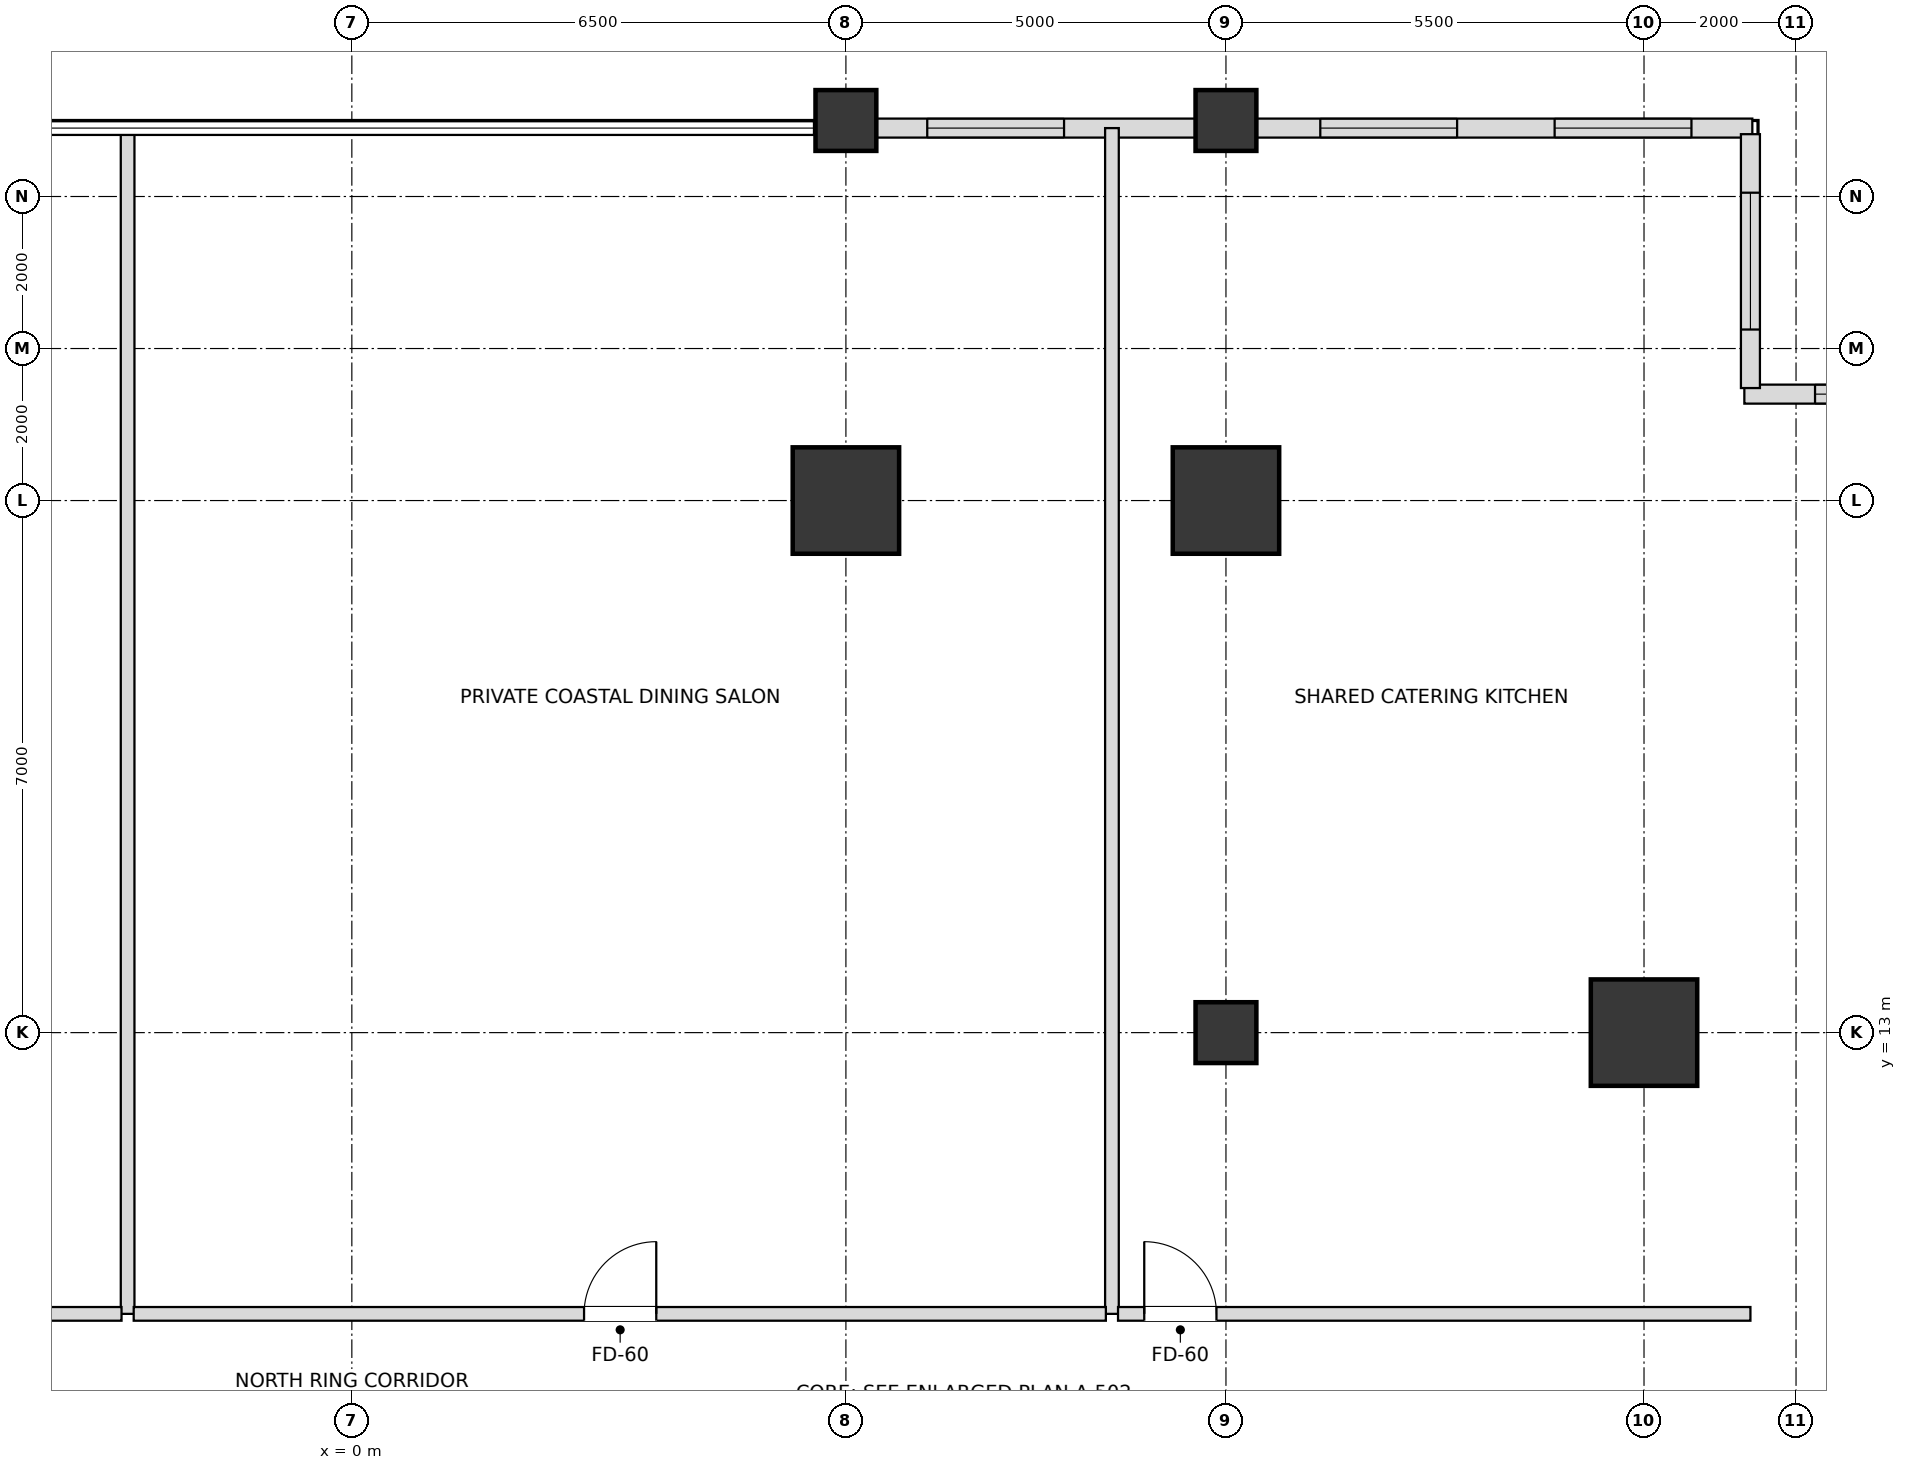
"""IFC4 building model, lengths in metres.
Left out: names, types, materials, properties, quantities, classifications, styles, units other than length and angle.
Written with IfcOpenShell. Run it as: python <this file> out.ifc"""

import sys

from ifc_helpers import new_model, si_unit, direction, frame, frame_2d, origin, origin_2d, place, context, subcontext, project, spatial, rectangle, extrude, element, fill, save


model = new_model("IFC4")
c1 = context("Model", 3, precision=1e-05, world=origin(), true_north=direction((0.0, 1.0)))
c2 = subcontext(c1, "Body", "Model", "MODEL_VIEW")
j1 = project(units=[si_unit("LENGTHUNIT", "METRE"), si_unit("PLANEANGLEUNIT", "RADIAN")], contexts=[c1])
p1 = place(None, origin())
s1 = spatial("IfcSite", under=j1, at=p1, CompositionType="ELEMENT")
p2 = place(p1, origin())
s2 = spatial("IfcBuilding", under=s1, at=p2, CompositionType="ELEMENT")
p3 = place(p2, frame((0.0, 0.0, 86.4)))
s3 = spatial("IfcBuildingStorey", under=s2, at=p3, CompositionType="ELEMENT", Elevation=86.4)
for number, where, z_axis, x_axis in (
    (1, (17.0, 13.0, 0.0), (0.0, 0.0, 1.0), (1.0, 0.0, 0.0)),
    (2, (11.5, 20.0, 0.0), (0.0, 0.0, 1.0), (1.0, 0.0, 0.0)),
    (3, (6.5, 20.0, 0.0), (0.0, 0.0, 1.0), (1.0, 0.0, 0.0)),
):
    element("IfcColumn", number, at=place(p3, frame(where, z_axis=z_axis, x_axis=x_axis)), inside=s3, PredefinedType="USERDEFINED", context=c2, shape_type="SweptSolid", body=[
        extrude(rectangle(XDim=1.4, YDim=1.4, at=origin_2d()), origin(), (0.0, 0.0, 1.0), 3.6),
    ])
for number, where, z_axis, x_axis in (
    (4, (11.5, 13.0, 0.0), (0.0, 0.0, 1.0), (1.0, 0.0, 0.0)),
    (5, (6.5, 25.0, 0.0), (0.0, 0.0, 1.0), (1.0, 0.0, 0.0)),
    (6, (11.5, 25.0, 0.0), (0.0, 0.0, 1.0), (1.0, 0.0, 0.0)),
):
    element("IfcColumn", number, at=place(p3, frame(where, z_axis=z_axis, x_axis=x_axis)), inside=s3, PredefinedType="COLUMN", context=c2, shape_type="SweptSolid", body=[
        extrude(rectangle(XDim=0.8, YDim=0.8, at=origin_2d()), origin(), (0.0, 0.0, 1.0), 3.6),
    ])
p4 = place(p3, frame((18.425, 24.9, 0.0), z_axis=(0.0, 0.0, 1.0), x_axis=(-1.0, 0.0, 0.0)))
e7 = element("IfcWall", 7, at=p4, inside=s3, PredefinedType="SOLIDWALL", context=c2, shape_type="SweptSolid", body=[
    extrude(rectangle(XDim=6.53, YDim=0.25, at=frame_2d((3.265, 0.0))), origin(), (0.0, 0.0, 1.0), 2.736),
])
p5 = place(p4, frame((0.801, 0.0, 0.72)))
e8 = element("IfcOpeningElement", 8, at=p5, cuts=e7, PredefinedType="OPENING", context=c2, shape_type="SweptSolid", body=[
    extrude(rectangle(XDim=1.8, YDim=1.68, at=frame_2d((0.9, 0.84))), frame((0.0, 0.135, 0.0), z_axis=(0.0, -1.0, 0.0), x_axis=(1.0, 0.0, 0.0)), (0.0, 0.0, 1.0), 0.27),
])
p6 = place(p4, frame((3.884, 0.0, 0.72)))
e9 = element("IfcOpeningElement", 9, at=p6, cuts=e7, PredefinedType="OPENING", context=c2, shape_type="SweptSolid", body=[
    extrude(rectangle(XDim=1.8, YDim=1.68, at=frame_2d((0.9, 0.84))), frame((0.0, 0.135, 0.0), z_axis=(0.0, -1.0, 0.0), x_axis=(1.0, 0.0, 0.0)), (0.0, 0.0, 1.0), 0.27),
])
p7 = place(p3, frame((11.105, 24.9, 0.0), z_axis=(0.0, 0.0, 1.0), x_axis=(-1.0, 0.0, 0.0)))
e10 = element("IfcWall", 10, at=p7, inside=s3, PredefinedType="SOLIDWALL", context=c2, shape_type="SweptSolid", body=[
    extrude(rectangle(XDim=4.21, YDim=0.25, at=frame_2d((2.105, 0.0))), origin(), (0.0, 0.0, 1.0), 2.736),
])
p8 = place(p7, frame((1.735, 0.0, 0.72)))
e11 = element("IfcOpeningElement", 11, at=p8, cuts=e10, PredefinedType="OPENING", context=c2, shape_type="SweptSolid", body=[
    extrude(rectangle(XDim=1.8, YDim=1.68, at=frame_2d((0.9, 0.84))), frame((0.0, 0.135, 0.0), z_axis=(0.0, -1.0, 0.0), x_axis=(1.0, 0.0, 0.0)), (0.0, 0.0, 1.0), 0.27),
])
p9 = place(p3, frame((21.98, 21.4, 0.0), z_axis=(0.0, 0.0, 1.0), x_axis=(-1.0, 0.0, 0.0)))
e12 = element("IfcWall", 12, at=p9, inside=s3, PredefinedType="SOLIDWALL", context=c2, shape_type="SweptSolid", body=[
    extrude(rectangle(XDim=3.66, YDim=0.25, at=frame_2d((1.83, 0.0))), origin(), (0.0, 0.0, 1.0), 2.736),
])
p10 = place(p9, frame((0.93, 0.0, 0.72)))
e13 = element("IfcOpeningElement", 13, at=p10, cuts=e12, PredefinedType="OPENING", context=c2, shape_type="SweptSolid", body=[
    extrude(rectangle(XDim=1.8, YDim=1.68, at=frame_2d((0.9, 0.84))), frame((0.0, 0.135, 0.0), z_axis=(0.0, -1.0, 0.0), x_axis=(1.0, 0.0, 0.0)), (0.0, 0.0, 1.0), 0.27),
])
p11 = place(p3, frame((18.4, 21.48, 0.0), z_axis=(0.0, 0.0, 1.0), x_axis=(0.0, 1.0, 0.0)))
e14 = element("IfcWall", 14, at=p11, inside=s3, PredefinedType="SOLIDWALL", context=c2, shape_type="SweptSolid", body=[
    extrude(rectangle(XDim=3.34, YDim=0.25, at=frame_2d((1.67, 0.0))), origin(), (0.0, 0.0, 1.0), 2.736),
])
p12 = place(p11, frame((0.77, 0.0, 0.72)))
e15 = element("IfcOpeningElement", 15, at=p12, cuts=e14, PredefinedType="OPENING", context=c2, shape_type="SweptSolid", body=[
    extrude(rectangle(XDim=1.8, YDim=1.68, at=frame_2d((0.9, 0.84))), frame((0.0, 0.135, 0.0), z_axis=(0.0, -1.0, 0.0), x_axis=(1.0, 0.0, 0.0)), (0.0, 0.0, 1.0), 0.27),
])
for number, where, z_axis, x_axis in (
    (16, (-2.95, 9.3, 0.0), (0.0, 0.0, 1.0), (0.0, 1.0, 0.0)),
    (17, (10.0, 9.3, 0.0), (0.0, 0.0, 1.0), (0.0, 1.0, 0.0)),
):
    element("IfcWall", number, at=place(p3, frame(where, z_axis=z_axis, x_axis=x_axis)), inside=s3, PredefinedType="PARTITIONING", context=c2, shape_type="SweptSolid", body=[
        extrude(rectangle(XDim=15.6, YDim=0.18, at=frame_2d((7.8, 0.0))), origin(), (0.0, 0.0, 1.0), 2.816),
    ])
p13 = place(p3, frame((-18.4, 9.3, 0.0), z_axis=(0.0, 0.0, 1.0), x_axis=(1.0, 0.0, 0.0)))
e18 = element("IfcWall", 18, at=p13, inside=s3, PredefinedType="PARTITIONING", context=c2, shape_type="SweptSolid", body=[
    extrude(rectangle(XDim=15.37, YDim=0.18, at=frame_2d((7.685, 0.0))), origin(), (0.0, 0.0, 1.0), 2.816),
])
p14 = place(p13, frame((10.555, 0.0, 0.0)))
e19 = element("IfcOpeningElement", 19, at=p14, cuts=e18, PredefinedType="OPENING", context=c2, shape_type="SweptSolid", body=[
    extrude(rectangle(XDim=0.95, YDim=2.15, at=frame_2d((0.475, 1.075))), frame((0.0, 0.1, 0.0), z_axis=(0.0, -1.0, 0.0), x_axis=(1.0, 0.0, 0.0)), (0.0, 0.0, 1.0), 0.2),
])
p15 = place(p3, frame((-2.87, 9.3, 0.0), z_axis=(0.0, 0.0, 1.0), x_axis=(1.0, 0.0, 0.0)))
e20 = element("IfcWall", 20, at=p15, inside=s3, PredefinedType="PARTITIONING", context=c2, shape_type="SweptSolid", body=[
    extrude(rectangle(XDim=12.79, YDim=0.18, at=frame_2d((6.395, 0.0))), origin(), (0.0, 0.0, 1.0), 2.816),
])
p16 = place(p15, frame((5.925, 0.0, 0.0)))
e21 = element("IfcOpeningElement", 21, at=p16, cuts=e20, PredefinedType="OPENING", context=c2, shape_type="SweptSolid", body=[
    extrude(rectangle(XDim=0.95, YDim=2.15, at=frame_2d((0.475, 1.075))), frame((0.0, 0.1, 0.0), z_axis=(0.0, -1.0, 0.0), x_axis=(1.0, 0.0, 0.0)), (0.0, 0.0, 1.0), 0.2),
])
p17 = place(p3, frame((10.08, 9.3, 0.0), z_axis=(0.0, 0.0, 1.0), x_axis=(1.0, 0.0, 0.0)))
e22 = element("IfcWall", 22, at=p17, inside=s3, PredefinedType="PARTITIONING", context=c2, shape_type="SweptSolid", body=[
    extrude(rectangle(XDim=8.32, YDim=0.18, at=frame_2d((4.16, 0.0))), origin(), (0.0, 0.0, 1.0), 2.816),
])
p18 = place(p17, frame((0.345, 0.0, 0.0)))
e23 = element("IfcOpeningElement", 23, at=p18, cuts=e22, PredefinedType="OPENING", context=c2, shape_type="SweptSolid", body=[
    extrude(rectangle(XDim=0.95, YDim=2.15, at=frame_2d((0.475, 1.075))), frame((0.0, 0.1, 0.0), z_axis=(0.0, -1.0, 0.0), x_axis=(1.0, 0.0, 0.0)), (0.0, 0.0, 1.0), 0.2),
])
p19 = place(p5, origin())
e24 = element("IfcWindow", 24, at=p19, inside=s3, PartitioningType="SINGLE_PANEL", PredefinedType="WINDOW", context=c2, shape_type="SweptSolid", body=[
    extrude(rectangle(XDim=1.8, YDim=1.68, at=frame_2d((0.9, 0.84))), frame((0.0, 0.03, 0.0), z_axis=(0.0, -1.0, 0.0), x_axis=(1.0, 0.0, 0.0)), (0.0, 0.0, 1.0), 0.06),
])
fill(e8, e24)
p20 = place(p6, origin())
e25 = element("IfcWindow", 25, at=p20, inside=s3, PartitioningType="SINGLE_PANEL", PredefinedType="WINDOW", context=c2, shape_type="SweptSolid", body=[
    extrude(rectangle(XDim=1.8, YDim=1.68, at=frame_2d((0.9, 0.84))), frame((0.0, 0.03, 0.0), z_axis=(0.0, -1.0, 0.0), x_axis=(1.0, 0.0, 0.0)), (0.0, 0.0, 1.0), 0.06),
])
fill(e9, e25)
p21 = place(p8, origin())
e26 = element("IfcWindow", 26, at=p21, inside=s3, PartitioningType="SINGLE_PANEL", PredefinedType="WINDOW", context=c2, shape_type="SweptSolid", body=[
    extrude(rectangle(XDim=1.8, YDim=1.68, at=frame_2d((0.9, 0.84))), frame((0.0, 0.03, 0.0), z_axis=(0.0, -1.0, 0.0), x_axis=(1.0, 0.0, 0.0)), (0.0, 0.0, 1.0), 0.06),
])
fill(e11, e26)
p22 = place(p10, origin())
e27 = element("IfcWindow", 27, at=p22, inside=s3, PartitioningType="SINGLE_PANEL", PredefinedType="WINDOW", context=c2, shape_type="SweptSolid", body=[
    extrude(rectangle(XDim=1.8, YDim=1.68, at=frame_2d((0.9, 0.84))), frame((0.0, 0.03, 0.0), z_axis=(0.0, -1.0, 0.0), x_axis=(1.0, 0.0, 0.0)), (0.0, 0.0, 1.0), 0.06),
])
fill(e13, e27)
p23 = place(p12, origin())
e28 = element("IfcWindow", 28, at=p23, inside=s3, PartitioningType="SINGLE_PANEL", PredefinedType="WINDOW", context=c2, shape_type="SweptSolid", body=[
    extrude(rectangle(XDim=1.8, YDim=1.68, at=frame_2d((0.9, 0.84))), frame((0.0, 0.03, 0.0), z_axis=(0.0, -1.0, 0.0), x_axis=(1.0, 0.0, 0.0)), (0.0, 0.0, 1.0), 0.06),
])
fill(e15, e28)
p24 = place(p16, origin())
e29 = element("IfcDoor", 29, at=p24, inside=s3, OperationType="SINGLE_SWING_RIGHT", PredefinedType="DOOR", context=c2, shape_type="SweptSolid", body=[
    extrude(rectangle(XDim=0.95, YDim=2.15, at=frame_2d((0.475, 1.075))), frame((0.0, 0.025, 0.0), z_axis=(0.0, -1.0, 0.0), x_axis=(1.0, 0.0, 0.0)), (0.0, 0.0, 1.0), 0.05),
])
fill(e21, e29)
p25 = place(p18, origin())
e30 = element("IfcDoor", 30, at=p25, inside=s3, OperationType="SINGLE_SWING_LEFT", PredefinedType="DOOR", context=c2, shape_type="SweptSolid", body=[
    extrude(rectangle(XDim=0.95, YDim=2.15, at=frame_2d((0.475, 1.075))), frame((0.0, 0.025, 0.0), z_axis=(0.0, -1.0, 0.0), x_axis=(1.0, 0.0, 0.0)), (0.0, 0.0, 1.0), 0.05),
])
fill(e23, e30)
save(model, sys.argv[1])
